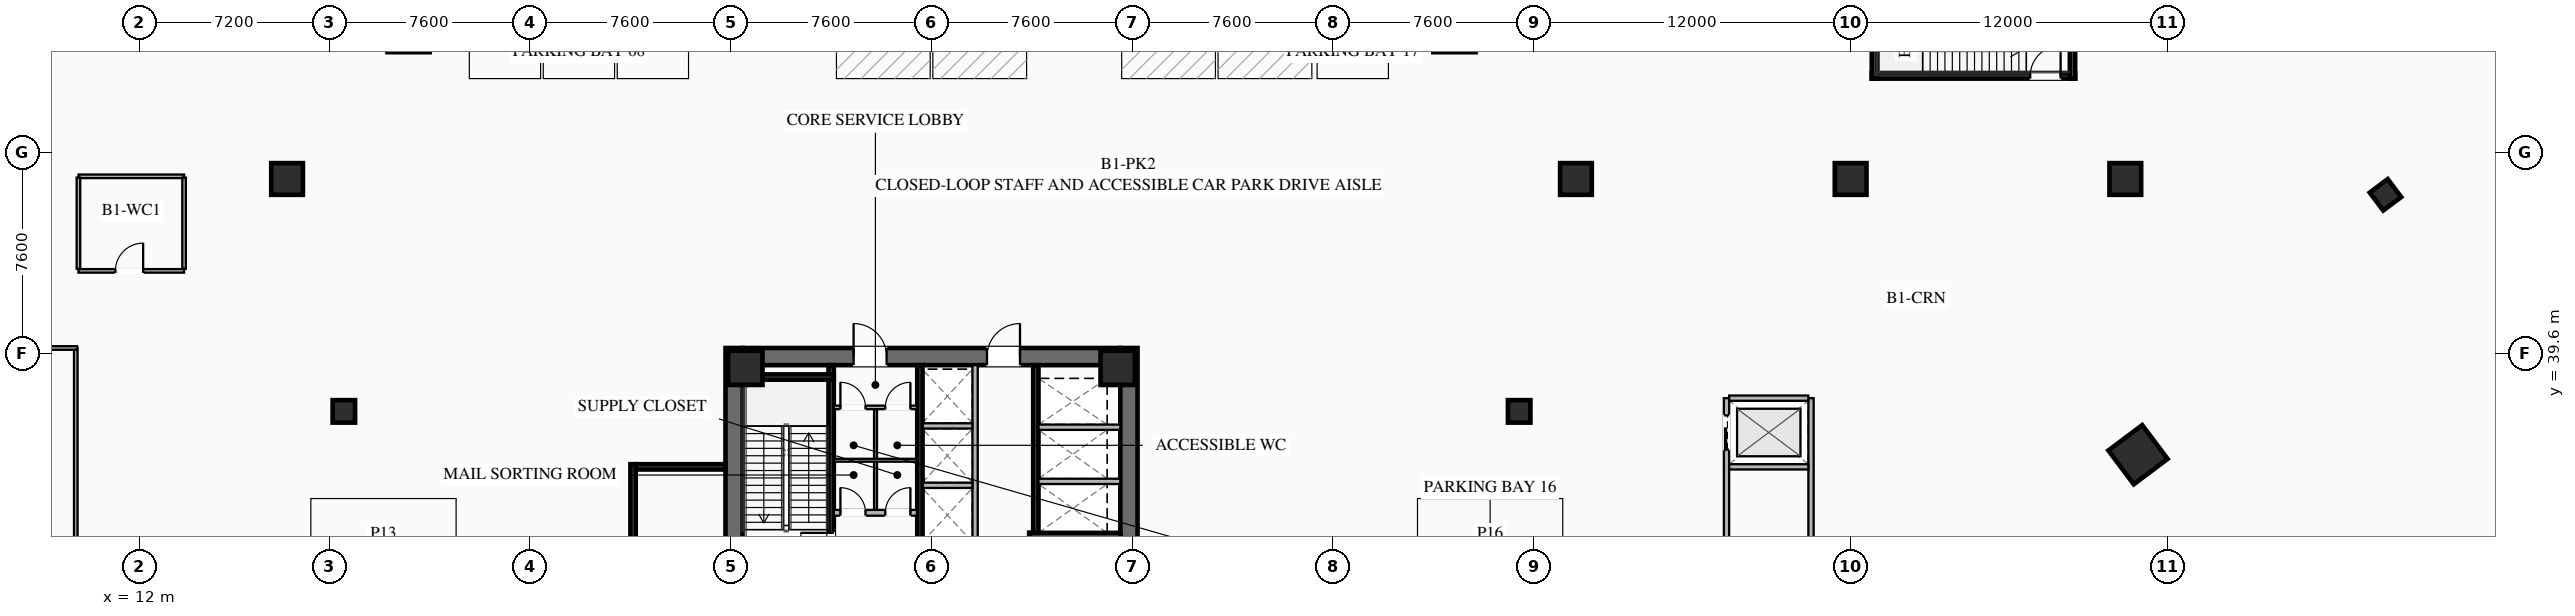
"""IFC4 building model, lengths in metres.
Left out: names, types, materials, properties, quantities, classifications, styles, units other than length and angle.
Written with IfcOpenShell. Run it as: python <this file> out.ifc"""

import sys

from ifc_helpers import new_model, si_unit, direction, frame, frame_2d, origin, origin_2d, place, context, subcontext, project, spatial, rectangle, hollow_rectangle, extrude, element, fill, save


model = new_model("IFC4")
c1 = context("Model", 3, precision=1e-05, world=origin(), true_north=direction((0.0, 1.0)))
c2 = subcontext(c1, "Body", "Model", "MODEL_VIEW")
j1 = project(units=[si_unit("LENGTHUNIT", "METRE"), si_unit("PLANEANGLEUNIT", "RADIAN")], contexts=[c1])
p1 = place(None, origin())
s1 = spatial("IfcSite", under=j1, at=p1, CompositionType="ELEMENT")
p2 = place(p1, origin())
s2 = spatial("IfcBuilding", under=s1, at=p2, CompositionType="ELEMENT")
p3 = place(p2, frame((0.0, 0.0, -5.5)))
s3 = spatial("IfcBuildingStorey", under=s2, at=p3, CompositionType="ELEMENT", Elevation=-5.5)
for number, where, z_axis, x_axis in (
    (1, (34.525, 24.2, 0.0), (0.0, 0.0, 1.0), (0.0, 1.0, 0.0)),
    (2, (49.475, 39.8, 0.0), (0.0, 0.0, 1.0), (0.0, -1.0, 0.0)),
):
    element("IfcWall", number, at=place(p3, frame(where, z_axis=z_axis, x_axis=x_axis)), inside=s3, PredefinedType="SHEAR", context=c2, shape_type="SweptSolid", body=[
        extrude(rectangle(XDim=15.6, YDim=0.65, at=frame_2d((7.8, 0.0))), origin(), (0.0, 0.0, 1.0), 5.5),
    ])
p4 = place(p3, frame((34.85, 39.475, 0.0), z_axis=(0.0, 0.0, 1.0), x_axis=(1.0, 0.0, 0.0)))
e3 = element("IfcWall", 3, at=p4, inside=s3, PredefinedType="SHEAR", context=c2, shape_type="SweptSolid", body=[
    extrude(rectangle(XDim=14.3, YDim=0.65, at=frame_2d((7.15, 0.0))), origin(), (0.0, 0.0, 1.0), 5.5),
])
p5 = place(p4, frame((4.2, 0.0, 0.0)))
e4 = element("IfcOpeningElement", 4, at=p5, cuts=e3, PredefinedType="OPENING", context=c2, shape_type="SweptSolid", body=[
    extrude(rectangle(XDim=1.25, YDim=2.25, at=frame_2d((0.625, 1.125))), frame((0.0, 0.335, 0.0), z_axis=(0.0, -1.0, 0.0), x_axis=(1.0, 0.0, 0.0)), (0.0, 0.0, 1.0), 0.67),
])
p6 = place(p4, frame((9.25, 0.0, 0.0)))
e5 = element("IfcOpeningElement", 5, at=p6, cuts=e3, PredefinedType="OPENING", context=c2, shape_type="SweptSolid", body=[
    extrude(rectangle(XDim=1.25, YDim=2.25, at=frame_2d((0.625, 1.125))), frame((0.0, 0.335, 0.0), z_axis=(0.0, -1.0, 0.0), x_axis=(1.0, 0.0, 0.0)), (0.0, 0.0, 1.0), 0.67),
])
for number, where, z_axis, x_axis in (
    (6, (49.05, 39.05, 0.0), (0.0, 0.0, 1.0), (1.0, 0.0, 0.0)),
    (7, (34.95, 39.05, 0.0), (0.0, 0.0, 1.0), (1.0, 0.0, 0.0)),
):
    element("IfcColumn", number, at=place(p3, frame(where, z_axis=z_axis, x_axis=x_axis)), inside=s3, PredefinedType="COLUMN", context=c2, shape_type="SweptSolid", body=[
        extrude(hollow_rectangle(XDim=1.3, YDim=1.3, WallThickness=0.05, at=origin_2d()), origin(), (0.0, 0.0, 1.0), 5.2),
    ])
for number, where, z_axis, x_axis in (
    (8, (64.25, 37.4, 0.0), (0.0, 0.0, 1.0), (1.0, 0.0, 0.0)),
    (9, (19.75, 37.4, 0.0), (0.0, 0.0, 1.0), (1.0, 0.0, 0.0)),
):
    element("IfcColumn", number, at=place(p3, frame(where, z_axis=z_axis, x_axis=x_axis)), inside=s3, PredefinedType="COLUMN", context=c2, shape_type="SweptSolid", body=[
        extrude(hollow_rectangle(XDim=0.85, YDim=0.85, WallThickness=0.035, at=origin_2d()), origin(), (0.0, 0.0, 1.0), 5.2),
    ])
p7 = place(p3, frame((87.68, 35.76, 0.0), z_axis=(0.0, 0.0, 1.0), x_axis=(0.799999996291, 0.600000004945, 0.0)))
e10 = element("IfcColumn", 10, at=p7, inside=s3, PredefinedType="COLUMN", context=c2, shape_type="SweptSolid", body=[
    extrude(hollow_rectangle(XDim=1.6, YDim=1.6, WallThickness=0.06, at=origin_2d()), origin(), (0.0, 0.0, 1.0), 5.2),
])
p8 = place(p3, frame((97.05, 45.6, 0.0), z_axis=(0.0, 0.0, 1.0), x_axis=(0.799999996291, 0.600000004945, 0.0)))
e11 = element("IfcColumn", 11, at=p8, inside=s3, PredefinedType="COLUMN", context=c2, shape_type="SweptSolid", body=[
    extrude(hollow_rectangle(XDim=0.85, YDim=0.85, WallThickness=0.035, at=origin_2d()), origin(), (0.0, 0.0, 1.0), 5.2),
])
for number, where, z_axis, x_axis in (
    (12, (17.6, 46.2, 0.0), (0.0, 0.0, 1.0), (1.0, 0.0, 0.0)),
    (13, (66.4, 46.2, 0.0), (0.0, 0.0, 1.0), (1.0, 0.0, 0.0)),
    (14, (76.8, 46.2, 0.0), (0.0, 0.0, 1.0), (1.0, 0.0, 0.0)),
    (15, (87.2, 46.2, 0.0), (0.0, 0.0, 1.0), (1.0, 0.0, 0.0)),
):
    element("IfcColumn", number, at=place(p3, frame(where, z_axis=z_axis, x_axis=x_axis)), inside=s3, PredefinedType="COLUMN", context=c2, shape_type="SweptSolid", body=[
        extrude(rectangle(XDim=1.2, YDim=1.2, at=origin_2d()), origin(), (0.0, 0.0, 1.0), 5.2),
    ])
p9 = place(p3, frame((38.2, 31.2, 0.0), z_axis=(0.0, 0.0, 1.0), x_axis=(0.0, 1.0, 0.0)))
e16 = element("IfcWall", 16, at=p9, inside=s3, PredefinedType="SHEAR", context=c2, shape_type="SweptSolid", body=[
    extrude(rectangle(XDim=7.95, YDim=0.2, at=frame_2d((3.975, 0.0))), origin(), (0.0, 0.0, 1.0), 5.2),
])
p10 = place(p9, frame((0.45, 0.0, 0.0)))
e17 = element("IfcOpeningElement", 17, at=p10, cuts=e16, PredefinedType="OPENING", context=c2, shape_type="SweptSolid", body=[
    extrude(rectangle(XDim=1.15, YDim=2.2, at=frame_2d((0.575, 1.1))), frame((0.0, 0.11, 0.0), z_axis=(0.0, -1.0, 0.0), x_axis=(1.0, 0.0, 0.0)), (0.0, 0.0, 1.0), 0.22),
])
p11 = place(p3, frame((34.85, 38.7, 0.0), z_axis=(0.0, 0.0, 1.0), x_axis=(1.0, 0.0, 0.0)))
e18 = element("IfcWall", 18, at=p11, inside=s3, PredefinedType="SHEAR", context=c2, shape_type="SweptSolid", body=[
    extrude(rectangle(XDim=3.45, YDim=0.2, at=frame_2d((1.725, 0.0))), origin(), (0.0, 0.0, 1.0), 5.2),
])
p12 = place(p3, frame((45.8, 32.8, 0.0), z_axis=(0.0, 0.0, 1.0), x_axis=(0.0, -1.0, 0.0)))
e19 = element("IfcWall", 19, at=p12, inside=s3, PredefinedType="SHEAR", context=c2, shape_type="SweptSolid", body=[
    extrude(rectangle(XDim=7.95, YDim=0.2, at=frame_2d((3.975, 0.0))), origin(), (0.0, 0.0, 1.0), 5.2),
])
p13 = place(p12, frame((0.45, 0.0, 0.0)))
e20 = element("IfcOpeningElement", 20, at=p13, cuts=e19, PredefinedType="OPENING", context=c2, shape_type="SweptSolid", body=[
    extrude(rectangle(XDim=1.15, YDim=2.2, at=frame_2d((0.575, 1.1))), frame((0.0, 0.11, 0.0), z_axis=(0.0, -1.0, 0.0), x_axis=(1.0, 0.0, 0.0)), (0.0, 0.0, 1.0), 0.22),
])
p14 = place(p3, frame((45.7, 32.7, 0.0), z_axis=(0.0, 0.0, 1.0), x_axis=(1.0, 0.0, 0.0)))
e21 = element("IfcWall", 21, at=p14, inside=s3, PredefinedType="SHEAR", context=c2, shape_type="SweptSolid", body=[
    extrude(rectangle(XDim=3.45, YDim=0.2, at=frame_2d((1.725, 0.0))), origin(), (0.0, 0.0, 1.0), 5.2),
])
p15 = place(p3, frame((41.56, 24.85, 0.0), z_axis=(0.0, 0.0, 1.0), x_axis=(0.0, 1.0, 0.0)))
e22 = element("IfcWall", 22, at=p15, inside=s3, PredefinedType="SHEAR", context=c2, shape_type="SweptSolid", body=[
    extrude(rectangle(XDim=14.3, YDim=0.2, at=frame_2d((7.15, 0.0))), origin(), (0.0, 0.0, 1.0), 5.2),
])
p16 = place(p3, frame((38.3, 33.56, 0.0), z_axis=(0.0, 0.0, 1.0), x_axis=(1.0, 0.0, 0.0)))
e23 = element("IfcWall", 23, at=p16, inside=s3, PredefinedType="SOLIDWALL", context=c2, shape_type="SweptSolid", body=[
    extrude(rectangle(XDim=3.15, YDim=0.22, at=frame_2d((1.575, 0.0))), origin(), (0.0, 0.0, 1.0), 4.243),
])
p17 = place(p16, frame((0.25, 0.0, 0.0)))
e24 = element("IfcOpeningElement", 24, at=p17, cuts=e23, PredefinedType="OPENING", context=c2, shape_type="SweptSolid", body=[
    extrude(rectangle(XDim=0.95, YDim=2.05, at=frame_2d((0.475, 1.025))), frame((0.0, 0.12, 0.0), z_axis=(0.0, -1.0, 0.0), x_axis=(1.0, 0.0, 0.0)), (0.0, 0.0, 1.0), 0.24),
])
p18 = place(p16, frame((1.95, 0.0, 0.0)))
e25 = element("IfcOpeningElement", 25, at=p18, cuts=e23, PredefinedType="OPENING", context=c2, shape_type="SweptSolid", body=[
    extrude(rectangle(XDim=0.95, YDim=2.05, at=frame_2d((0.475, 1.025))), frame((0.0, 0.12, 0.0), z_axis=(0.0, -1.0, 0.0), x_axis=(1.0, 0.0, 0.0)), (0.0, 0.0, 1.0), 0.24),
])
p19 = place(p3, frame((45.95, 39.15, 0.0), z_axis=(0.0, 0.0, 1.0), x_axis=(0.0, -1.0, 0.0)))
e26 = element("IfcWall", 26, at=p19, inside=s3, PredefinedType="SHEAR", context=c2, shape_type="SweptSolid", body=[
    extrude(rectangle(XDim=6.35, YDim=0.2, at=frame_2d((3.175, 0.0))), origin(), (0.0, 0.0, 1.0), 5.2),
])
for number, where, z_axis, x_axis in (
    (27, (46.05, 34.75, 0.0), (0.0, 0.0, 1.0), (1.0, 0.0, 0.0)),
    (28, (46.05, 36.8, 0.0), (0.0, 0.0, 1.0), (1.0, 0.0, 0.0)),
):
    element("IfcWall", number, at=place(p3, frame(where, z_axis=z_axis, x_axis=x_axis)), inside=s3, PredefinedType="SOLIDWALL", context=c2, shape_type="SweptSolid", body=[
        extrude(rectangle(XDim=3.1, YDim=0.2, at=frame_2d((1.55, 0.0))), origin(), (0.0, 0.0, 1.0), 5.2),
    ])
p20 = place(p3, frame((38.3, 37.55, 0.0), z_axis=(0.0, 0.0, 1.0), x_axis=(1.0, 0.0, 0.0)))
e29 = element("IfcWall", 29, at=p20, inside=s3, PredefinedType="PARTITIONING", context=c2, shape_type="SweptSolid", body=[
    extrude(rectangle(XDim=3.15, YDim=0.135, at=frame_2d((1.575, 0.0))), origin(), (0.0, 0.0, 1.0), 4.243),
])
p21 = place(p20, frame((0.25, 0.0, 0.0)))
e30 = element("IfcOpeningElement", 30, at=p21, cuts=e29, PredefinedType="OPENING", context=c2, shape_type="SweptSolid", body=[
    extrude(rectangle(XDim=0.95, YDim=2.05, at=frame_2d((0.475, 1.025))), frame((0.0, 0.077, 0.0), z_axis=(0.0, -1.0, 0.0), x_axis=(1.0, 0.0, 0.0)), (0.0, 0.0, 1.0), 0.155),
])
p22 = place(p20, frame((1.95, 0.0, 0.0)))
e31 = element("IfcOpeningElement", 31, at=p22, cuts=e29, PredefinedType="OPENING", context=c2, shape_type="SweptSolid", body=[
    extrude(rectangle(XDim=0.95, YDim=2.05, at=frame_2d((0.475, 1.025))), frame((0.0, 0.077, 0.0), z_axis=(0.0, -1.0, 0.0), x_axis=(1.0, 0.0, 0.0)), (0.0, 0.0, 1.0), 0.155),
])
p23 = place(p3, frame((39.88, 33.68, 0.0), z_axis=(0.0, 0.0, 1.0), x_axis=(0.0, 1.0, 0.0)))
e32 = element("IfcWall", 32, at=p23, inside=s3, PredefinedType="PARTITIONING", context=c2, shape_type="SweptSolid", body=[
    extrude(rectangle(XDim=3.8, YDim=0.11, at=frame_2d((1.9, 0.0))), origin(), (0.0, 0.0, 1.0), 4.243),
])
p24 = place(p3, frame((38.3, 35.55, 0.0), z_axis=(0.0, 0.0, 1.0), x_axis=(1.0, 0.0, 0.0)))
e33 = element("IfcWall", 33, at=p24, inside=s3, PredefinedType="PARTITIONING", context=c2, shape_type="SweptSolid", body=[
    extrude(rectangle(XDim=3.15, YDim=0.11, at=frame_2d((1.575, 0.0))), origin(), (0.0, 0.0, 1.0), 4.243),
])
p25 = place(p3, frame((43.65, 32.35, 0.0), z_axis=(0.0, 0.0, 1.0), x_axis=(0.0, 1.0, 0.0)))
e34 = element("IfcWall", 34, at=p25, inside=s3, PredefinedType="SOLIDWALL", context=c2, shape_type="SweptSolid", body=[
    extrude(rectangle(XDim=6.8, YDim=0.2, at=frame_2d((3.4, 0.0))), origin(), (0.0, 0.0, 1.0), 5.2),
])
for number, where, z_axis, x_axis in (
    (35, (41.67, 34.6, 0.0), (0.0, 0.0, 1.0), (1.0, 0.0, 0.0)),
    (36, (41.67, 36.85, 0.0), (0.0, 0.0, 1.0), (1.0, 0.0, 0.0)),
):
    element("IfcWall", number, at=place(p3, frame(where, z_axis=z_axis, x_axis=x_axis)), inside=s3, PredefinedType="SOLIDWALL", context=c2, shape_type="SweptSolid", body=[
        extrude(rectangle(XDim=1.88, YDim=0.2, at=frame_2d((0.94, 0.0))), origin(), (0.0, 0.0, 1.0), 5.2),
    ])
p26 = place(p3, frame((30.7, 28.6, 0.0), z_axis=(0.0, 0.0, 1.0), x_axis=(0.0, 1.0, 0.0)))
e37 = element("IfcWall", 37, at=p26, inside=s3, PredefinedType="SHEAR", context=c2, shape_type="SweptSolid", body=[
    extrude(rectangle(XDim=6.8, YDim=0.2, at=frame_2d((3.4, 0.0))), origin(), (0.0, 0.0, 1.0), 5.2),
])
p27 = place(p3, frame((30.8, 35.3, 0.0), z_axis=(0.0, 0.0, 1.0), x_axis=(1.0, 0.0, 0.0)))
e38 = element("IfcWall", 38, at=p27, inside=s3, PredefinedType="SHEAR", context=c2, shape_type="SweptSolid", body=[
    extrude(rectangle(XDim=3.4, YDim=0.2, at=frame_2d((1.7, 0.0))), origin(), (0.0, 0.0, 1.0), 5.2),
])
p28 = place(p3, frame((77.6, 50.1, 0.0), z_axis=(0.0, 0.0, 1.0), x_axis=(1.0, 0.0, 0.0)))
e39 = element("IfcWall", 39, at=p28, inside=s3, PredefinedType="SHEAR", context=c2, shape_type="SweptSolid", body=[
    extrude(rectangle(XDim=7.7, YDim=0.2, at=frame_2d((3.85, 0.0))), origin(), (0.0, 0.0, 1.0), 5.2),
])
p29 = place(p28, frame((6.0, 0.0, 0.0)))
e40 = element("IfcOpeningElement", 40, at=p29, cuts=e39, PredefinedType="OPENING", context=c2, shape_type="SweptSolid", body=[
    extrude(rectangle(XDim=1.15, YDim=2.2, at=frame_2d((0.575, 1.1))), frame((0.0, 0.11, 0.0), z_axis=(0.0, -1.0, 0.0), x_axis=(1.0, 0.0, 0.0)), (0.0, 0.0, 1.0), 0.22),
])
for number, where, z_axis, x_axis in (
    (41, (77.7, 50.0, 0.0), (0.0, 0.0, 1.0), (0.0, 1.0, 0.0)),
    (42, (85.2, 50.0, 0.0), (0.0, 0.0, 1.0), (0.0, 1.0, 0.0)),
):
    element("IfcWall", number, at=place(p3, frame(where, z_axis=z_axis, x_axis=x_axis)), inside=s3, PredefinedType="SHEAR", context=c2, shape_type="SweptSolid", body=[
        extrude(rectangle(XDim=3.9, YDim=0.2, at=frame_2d((1.95, 0.0))), origin(), (0.0, 0.0, 1.0), 5.2),
    ])
p30 = place(p3, frame((72.1, 26.1, 0.0), z_axis=(0.0, 0.0, 1.0), x_axis=(0.0, 1.0, 0.0)))
e43 = element("IfcWall", 43, at=p30, inside=s3, PredefinedType="SOLIDWALL", context=c2, shape_type="SweptSolid", body=[
    extrude(rectangle(XDim=11.8, YDim=0.2, at=frame_2d((5.9, 0.0))), origin(), (0.0, 0.0, 1.0), 4.243),
])
p31 = place(p30, frame((0.65, 0.0, 0.0)))
e44 = element("IfcOpeningElement", 44, at=p31, cuts=e43, PredefinedType="OPENING", context=c2, shape_type="SweptSolid", body=[
    extrude(rectangle(XDim=1.3, YDim=2.25, at=frame_2d((0.65, 1.125))), frame((0.0, 0.11, 0.0), z_axis=(0.0, -1.0, 0.0), x_axis=(1.0, 0.0, 0.0)), (0.0, 0.0, 1.0), 0.22),
])
p32 = place(p30, frame((9.85, 0.0, 0.0)))
e45 = element("IfcOpeningElement", 45, at=p32, cuts=e43, PredefinedType="OPENING", context=c2, shape_type="SweptSolid", body=[
    extrude(rectangle(XDim=1.3, YDim=2.25, at=frame_2d((0.65, 1.125))), frame((0.0, 0.11, 0.0), z_axis=(0.0, -1.0, 0.0), x_axis=(1.0, 0.0, 0.0)), (0.0, 0.0, 1.0), 0.22),
])
p33 = place(p3, frame((75.3, 26.1, 0.0), z_axis=(0.0, 0.0, 1.0), x_axis=(0.0, 1.0, 0.0)))
e46 = element("IfcWall", 46, at=p33, inside=s3, PredefinedType="SOLIDWALL", context=c2, shape_type="SweptSolid", body=[
    extrude(rectangle(XDim=11.8, YDim=0.2, at=frame_2d((5.9, 0.0))), origin(), (0.0, 0.0, 1.0), 4.243),
])
for number, where, z_axis, x_axis in (
    (47, (72.2, 35.3, 0.0), (0.0, 0.0, 1.0), (1.0, 0.0, 0.0)),
    (48, (72.2, 37.9, 0.0), (0.0, 0.0, 1.0), (1.0, 0.0, 0.0)),
):
    element("IfcWall", number, at=place(p3, frame(where, z_axis=z_axis, x_axis=x_axis)), inside=s3, PredefinedType="SOLIDWALL", context=c2, shape_type="SweptSolid", body=[
        extrude(rectangle(XDim=3.0, YDim=0.2, at=frame_2d((1.5, 0.0))), origin(), (0.0, 0.0, 1.0), 4.243),
    ])
p34 = place(p3, frame((9.6, 24.3, 0.0), z_axis=(0.0, 0.0, 1.0), x_axis=(0.0, 1.0, 0.0)))
e49 = element("IfcWall", 49, at=p34, inside=s3, PredefinedType="PARTITIONING", context=c2, shape_type="SweptSolid", body=[
    extrude(rectangle(XDim=15.5, YDim=0.135, at=frame_2d((7.75, 0.0))), origin(), (0.0, 0.0, 1.0), 4.243),
])
p35 = place(p3, frame((0.7, 39.8, 0.0), z_axis=(0.0, 0.0, 1.0), x_axis=(1.0, 0.0, 0.0)))
e50 = element("IfcWall", 50, at=p35, inside=s3, PredefinedType="PARTITIONING", context=c2, shape_type="SweptSolid", body=[
    extrude(rectangle(XDim=8.95, YDim=0.135, at=frame_2d((4.475, 0.0))), origin(), (0.0, 0.0, 1.0), 4.243),
])
p36 = place(p3, frame((9.7, 42.72, 0.0), z_axis=(0.0, 0.0, 1.0), x_axis=(1.0, 0.0, 0.0)))
e51 = element("IfcWall", 51, at=p36, inside=s3, PredefinedType="PARTITIONING", context=c2, shape_type="SweptSolid", body=[
    extrude(rectangle(XDim=4.0, YDim=0.135, at=frame_2d((2.0, 0.0))), origin(), (0.0, 0.0, 1.0), 4.243),
])
p37 = place(p36, frame((1.4, 0.0, 0.0)))
e52 = element("IfcOpeningElement", 52, at=p37, cuts=e51, PredefinedType="OPENING", context=c2, shape_type="SweptSolid", body=[
    extrude(rectangle(XDim=1.05, YDim=2.2, at=frame_2d((0.525, 1.1))), frame((0.0, 0.077, 0.0), z_axis=(0.0, -1.0, 0.0), x_axis=(1.0, 0.0, 0.0)), (0.0, 0.0, 1.0), 0.155),
])
p38 = place(p3, frame((9.7, 46.3, 0.0), z_axis=(0.0, 0.0, 1.0), x_axis=(1.0, 0.0, 0.0)))
e53 = element("IfcWall", 53, at=p38, inside=s3, PredefinedType="PARTITIONING", context=c2, shape_type="SweptSolid", body=[
    extrude(rectangle(XDim=4.0, YDim=0.135, at=frame_2d((2.0, 0.0))), origin(), (0.0, 0.0, 1.0), 4.243),
])
for number, where, z_axis, x_axis in (
    (54, (9.7, 42.8, 0.0), (0.0, 0.0, 1.0), (0.0, 1.0, 0.0)),
    (55, (13.7, 42.8, 0.0), (0.0, 0.0, 1.0), (0.0, 1.0, 0.0)),
):
    element("IfcWall", number, at=place(p3, frame(where, z_axis=z_axis, x_axis=x_axis)), inside=s3, PredefinedType="PARTITIONING", context=c2, shape_type="SweptSolid", body=[
        extrude(rectangle(XDim=3.45, YDim=0.135, at=frame_2d((1.725, 0.0))), origin(), (0.0, 0.0, 1.0), 4.243),
    ])
p39 = place(p5, origin())
e56 = element("IfcDoor", 56, at=p39, inside=s3, OperationType="SINGLE_SWING_LEFT", PredefinedType="DOOR", context=c2, shape_type="SweptSolid", body=[
    extrude(rectangle(XDim=1.25, YDim=2.25, at=frame_2d((0.625, 1.125))), frame((0.0, 0.025, 0.0), z_axis=(0.0, -1.0, 0.0), x_axis=(1.0, 0.0, 0.0)), (0.0, 0.0, 1.0), 0.05),
])
fill(e4, e56)
p40 = place(p6, origin())
e57 = element("IfcDoor", 57, at=p40, inside=s3, OperationType="SINGLE_SWING_RIGHT", PredefinedType="DOOR", context=c2, shape_type="SweptSolid", body=[
    extrude(rectangle(XDim=1.25, YDim=2.25, at=frame_2d((0.625, 1.125))), frame((0.0, 0.025, 0.0), z_axis=(0.0, -1.0, 0.0), x_axis=(1.0, 0.0, 0.0)), (0.0, 0.0, 1.0), 0.05),
])
fill(e5, e57)
p41 = place(p10, origin())
e58 = element("IfcDoor", 58, at=p41, inside=s3, OperationType="SINGLE_SWING_RIGHT", PredefinedType="DOOR", context=c2, shape_type="SweptSolid", body=[
    extrude(rectangle(XDim=1.15, YDim=2.2, at=frame_2d((0.575, 1.1))), frame((0.0, 0.025, 0.0), z_axis=(0.0, -1.0, 0.0), x_axis=(1.0, 0.0, 0.0)), (0.0, 0.0, 1.0), 0.05),
])
fill(e17, e58)
p42 = place(p21, origin())
e59 = element("IfcDoor", 59, at=p42, inside=s3, OperationType="SINGLE_SWING_LEFT", PredefinedType="DOOR", context=c2, shape_type="SweptSolid", body=[
    extrude(rectangle(XDim=0.95, YDim=2.05, at=frame_2d((0.475, 1.025))), frame((0.0, 0.025, 0.0), z_axis=(0.0, -1.0, 0.0), x_axis=(1.0, 0.0, 0.0)), (0.0, 0.0, 1.0), 0.05),
])
fill(e30, e59)
p43 = place(p22, origin())
e60 = element("IfcDoor", 60, at=p43, inside=s3, OperationType="SINGLE_SWING_RIGHT", PredefinedType="DOOR", context=c2, shape_type="SweptSolid", body=[
    extrude(rectangle(XDim=0.95, YDim=2.05, at=frame_2d((0.475, 1.025))), frame((0.0, 0.025, 0.0), z_axis=(0.0, -1.0, 0.0), x_axis=(1.0, 0.0, 0.0)), (0.0, 0.0, 1.0), 0.05),
])
fill(e31, e60)
p44 = place(p17, origin())
e61 = element("IfcDoor", 61, at=p44, inside=s3, OperationType="SINGLE_SWING_LEFT", PredefinedType="DOOR", context=c2, shape_type="SweptSolid", body=[
    extrude(rectangle(XDim=0.95, YDim=2.05, at=frame_2d((0.475, 1.025))), frame((0.0, 0.025, 0.0), z_axis=(0.0, -1.0, 0.0), x_axis=(1.0, 0.0, 0.0)), (0.0, 0.0, 1.0), 0.05),
])
fill(e24, e61)
p45 = place(p18, origin())
e62 = element("IfcDoor", 62, at=p45, inside=s3, OperationType="SINGLE_SWING_RIGHT", PredefinedType="DOOR", context=c2, shape_type="SweptSolid", body=[
    extrude(rectangle(XDim=0.95, YDim=2.05, at=frame_2d((0.475, 1.025))), frame((0.0, 0.025, 0.0), z_axis=(0.0, -1.0, 0.0), x_axis=(1.0, 0.0, 0.0)), (0.0, 0.0, 1.0), 0.05),
])
fill(e25, e62)
p46 = place(p29, origin())
e63 = element("IfcDoor", 63, at=p46, inside=s3, OperationType="SINGLE_SWING_RIGHT", PredefinedType="DOOR", context=c2, shape_type="SweptSolid", body=[
    extrude(rectangle(XDim=1.15, YDim=2.2, at=frame_2d((0.575, 1.1))), frame((0.0, 0.025, 0.0), z_axis=(0.0, -1.0, 0.0), x_axis=(1.0, 0.0, 0.0)), (0.0, 0.0, 1.0), 0.05),
])
fill(e40, e63)
p47 = place(p37, origin())
e64 = element("IfcDoor", 64, at=p47, inside=s3, OperationType="SINGLE_SWING_RIGHT", PredefinedType="DOOR", context=c2, shape_type="SweptSolid", body=[
    extrude(rectangle(XDim=1.05, YDim=2.2, at=frame_2d((0.525, 1.1))), frame((0.0, 0.025, 0.0), z_axis=(0.0, -1.0, 0.0), x_axis=(1.0, 0.0, 0.0)), (0.0, 0.0, 1.0), 0.05),
])
fill(e52, e64)
p48 = place(p32, origin())
e65 = element("IfcDoor", 65, at=p48, inside=s3, OperationType="SLIDING_TO_LEFT", PredefinedType="DOOR", context=c2, shape_type="SweptSolid", body=[
    extrude(rectangle(XDim=1.3, YDim=2.25, at=frame_2d((0.65, 1.125))), frame((0.0, 0.025, 0.0), z_axis=(0.0, -1.0, 0.0), x_axis=(1.0, 0.0, 0.0)), (0.0, 0.0, 1.0), 0.05),
])
fill(e45, e65)
save(model, sys.argv[1])
